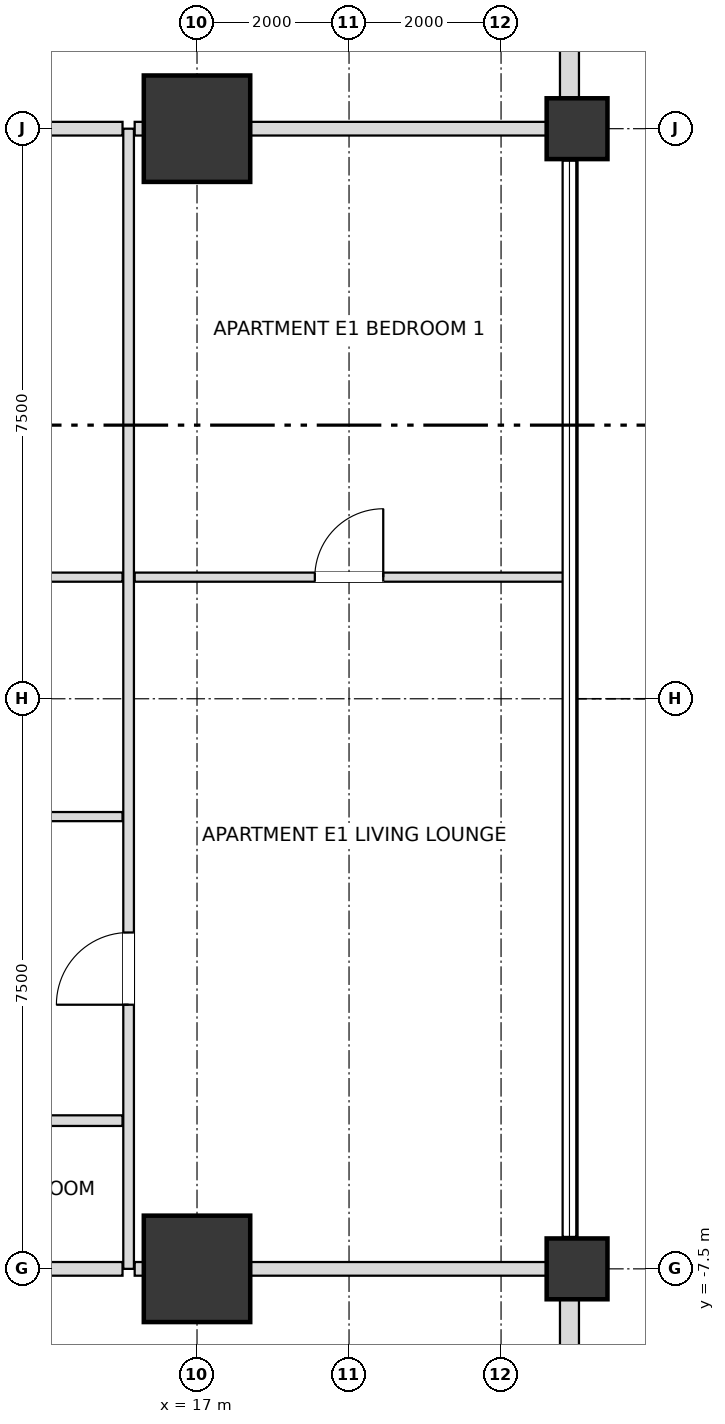
"""IFC4 building model, lengths in metres.
Left out: names, types, materials, properties, quantities, classifications, styles, units other than length and angle.
Written with IfcOpenShell. Run it as: python <this file> out.ifc"""

import sys

from ifc_helpers import new_model, si_unit, direction, frame, frame_2d, origin, origin_2d, place, context, subcontext, project, spatial, rectangle, extrude, element, fill, save


model = new_model("IFC4")
c1 = context("Model", 3, precision=1e-05, world=origin(), true_north=direction((0.0, 1.0)))
c2 = subcontext(c1, "Body", "Model", "MODEL_VIEW")
j1 = project(units=[si_unit("LENGTHUNIT", "METRE"), si_unit("PLANEANGLEUNIT", "RADIAN")], contexts=[c1])
p1 = place(None, origin())
s1 = spatial("IfcSite", under=j1, at=p1, CompositionType="ELEMENT")
p2 = place(p1, origin())
s2 = spatial("IfcBuilding", under=s1, at=p2, CompositionType="ELEMENT")
p3 = place(p2, frame((0.0, 0.0, 39.6)))
s3 = spatial("IfcBuildingStorey", under=s2, at=p3, CompositionType="ELEMENT", Elevation=39.6)
for number, where, z_axis, x_axis in (
    (1, (17.0, -7.5, 0.0), (0.0, 0.0, 1.0), (1.0, 0.0, 0.0)),
    (2, (17.0, 7.5, 0.0), (0.0, 0.0, 1.0), (1.0, 0.0, 0.0)),
):
    element("IfcColumn", number, at=place(p3, frame(where, z_axis=z_axis, x_axis=x_axis)), inside=s3, PredefinedType="USERDEFINED", context=c2, shape_type="SweptSolid", body=[
        extrude(rectangle(XDim=1.4, YDim=1.4, at=origin_2d()), origin(), (0.0, 0.0, 1.0), 3.6),
    ])
for number, where, z_axis, x_axis in (
    (3, (22.0, -7.5, 0.0), (0.0, 0.0, 1.0), (1.0, 0.0, 0.0)),
    (4, (22.0, 7.5, 0.0), (0.0, 0.0, 1.0), (1.0, 0.0, 0.0)),
):
    element("IfcColumn", number, at=place(p3, frame(where, z_axis=z_axis, x_axis=x_axis)), inside=s3, PredefinedType="COLUMN", context=c2, shape_type="SweptSolid", body=[
        extrude(rectangle(XDim=0.8, YDim=0.8, at=origin_2d()), origin(), (0.0, 0.0, 1.0), 3.6),
    ])
p4 = place(p3, frame((21.9, -12.605, 0.0), z_axis=(0.0, 0.0, 1.0), x_axis=(0.0, 1.0, 0.0)))
e5 = element("IfcWall", 5, at=p4, inside=s3, PredefinedType="SOLIDWALL", context=c2, shape_type="SweptSolid", body=[
    extrude(rectangle(XDim=4.71, YDim=0.25, at=frame_2d((2.355, 0.0))), origin(), (0.0, 0.0, 1.0), 2.736),
])
p5 = place(p4, frame((1.455, 0.0, 0.72)))
e6 = element("IfcOpeningElement", 6, at=p5, cuts=e5, PredefinedType="OPENING", context=c2, shape_type="SweptSolid", body=[
    extrude(rectangle(XDim=1.8, YDim=1.68, at=frame_2d((0.9, 0.84))), frame((0.0, 0.135, 0.0), z_axis=(0.0, -1.0, 0.0), x_axis=(1.0, 0.0, 0.0)), (0.0, 0.0, 1.0), 0.27),
])
p6 = place(p3, frame((21.9, 7.895, 0.0), z_axis=(0.0, 0.0, 1.0), x_axis=(0.0, 1.0, 0.0)))
e7 = element("IfcWall", 7, at=p6, inside=s3, PredefinedType="SOLIDWALL", context=c2, shape_type="SweptSolid", body=[
    extrude(rectangle(XDim=4.71, YDim=0.25, at=frame_2d((2.355, 0.0))), origin(), (0.0, 0.0, 1.0), 2.736),
])
p7 = place(p6, frame((1.455, 0.0, 0.72)))
e8 = element("IfcOpeningElement", 8, at=p7, cuts=e7, PredefinedType="OPENING", context=c2, shape_type="SweptSolid", body=[
    extrude(rectangle(XDim=1.8, YDim=1.68, at=frame_2d((0.9, 0.84))), frame((0.0, 0.135, 0.0), z_axis=(0.0, -1.0, 0.0), x_axis=(1.0, 0.0, 0.0)), (0.0, 0.0, 1.0), 0.27),
])
p8 = place(p3, frame((16.1, -7.5, 0.0), z_axis=(0.0, 0.0, 1.0), x_axis=(0.0, 1.0, 0.0)))
e9 = element("IfcWall", 9, at=p8, inside=s3, PredefinedType="PARTITIONING", context=c2, shape_type="SweptSolid", body=[
    extrude(rectangle(XDim=15.0, YDim=0.14, at=frame_2d((7.5, 0.0))), origin(), (0.0, 0.0, 1.0), 3.38),
])
p9 = place(p8, frame((3.475, 0.0, 0.0)))
e10 = element("IfcOpeningElement", 10, at=p9, cuts=e9, PredefinedType="OPENING", context=c2, shape_type="SweptSolid", body=[
    extrude(rectangle(XDim=0.95, YDim=2.1, at=frame_2d((0.475, 1.05))), frame((0.0, 0.08, 0.0), z_axis=(0.0, -1.0, 0.0), x_axis=(1.0, 0.0, 0.0)), (0.0, 0.0, 1.0), 0.16),
])
p10 = place(p3, frame((8.38, -7.5, 0.0), z_axis=(0.0, 0.0, 1.0), x_axis=(1.0, 0.0, 0.0)))
e11 = element("IfcWall", 11, at=p10, inside=s3, PredefinedType="PARTITIONING", context=c2, shape_type="SweptSolid", body=[
    extrude(rectangle(XDim=7.64, YDim=0.18, at=frame_2d((3.82, 0.0))), origin(), (0.0, 0.0, 1.0), 2.816),
])
p11 = place(p3, frame((16.18, -7.5, 0.0), z_axis=(0.0, 0.0, 1.0), x_axis=(1.0, 0.0, 0.0)))
e12 = element("IfcWall", 12, at=p11, inside=s3, PredefinedType="PARTITIONING", context=c2, shape_type="SweptSolid", body=[
    extrude(rectangle(XDim=5.72, YDim=0.18, at=frame_2d((2.86, 0.0))), origin(), (0.0, 0.0, 1.0), 2.816),
])
p12 = place(p3, frame((8.38, -5.55, 0.0), z_axis=(0.0, 0.0, 1.0), x_axis=(1.0, 0.0, 0.0)))
e13 = element("IfcWall", 13, at=p12, inside=s3, PredefinedType="PARTITIONING", context=c2, shape_type="SweptSolid", body=[
    extrude(rectangle(XDim=7.64, YDim=0.14, at=frame_2d((3.82, 0.0))), origin(), (0.0, 0.0, 1.0), 2.948),
])
p13 = place(p12, frame((3.37, 0.0, 0.0)))
e14 = element("IfcOpeningElement", 14, at=p13, cuts=e13, PredefinedType="OPENING", context=c2, shape_type="SweptSolid", body=[
    extrude(rectangle(XDim=0.9, YDim=2.1, at=frame_2d((0.45, 1.05))), frame((0.0, 0.08, 0.0), z_axis=(0.0, -1.0, 0.0), x_axis=(1.0, 0.0, 0.0)), (0.0, 0.0, 1.0), 0.16),
])
p14 = place(p3, frame((8.38, -1.55, 0.0), z_axis=(0.0, 0.0, 1.0), x_axis=(1.0, 0.0, 0.0)))
e15 = element("IfcWall", 15, at=p14, inside=s3, PredefinedType="PARTITIONING", context=c2, shape_type="SweptSolid", body=[
    extrude(rectangle(XDim=7.64, YDim=0.12, at=frame_2d((3.82, 0.0))), origin(), (0.0, 0.0, 1.0), 2.948),
])
p15 = place(p14, frame((3.345, 0.0, 0.0)))
e16 = element("IfcOpeningElement", 16, at=p15, cuts=e15, PredefinedType="OPENING", context=c2, shape_type="SweptSolid", body=[
    extrude(rectangle(XDim=0.95, YDim=2.1, at=frame_2d((0.475, 1.05))), frame((0.0, 0.07, 0.0), z_axis=(0.0, -1.0, 0.0), x_axis=(1.0, 0.0, 0.0)), (0.0, 0.0, 1.0), 0.14),
])
p16 = place(p3, frame((8.38, 1.6, 0.0), z_axis=(0.0, 0.0, 1.0), x_axis=(1.0, 0.0, 0.0)))
e17 = element("IfcWall", 17, at=p16, inside=s3, PredefinedType="PARTITIONING", context=c2, shape_type="SweptSolid", body=[
    extrude(rectangle(XDim=7.64, YDim=0.12, at=frame_2d((3.82, 0.0))), origin(), (0.0, 0.0, 1.0), 2.948),
])
p17 = place(p16, frame((3.37, 0.0, 0.0)))
e18 = element("IfcOpeningElement", 18, at=p17, cuts=e17, PredefinedType="OPENING", context=c2, shape_type="SweptSolid", body=[
    extrude(rectangle(XDim=0.9, YDim=2.1, at=frame_2d((0.45, 1.05))), frame((0.0, 0.07, 0.0), z_axis=(0.0, -1.0, 0.0), x_axis=(1.0, 0.0, 0.0)), (0.0, 0.0, 1.0), 0.14),
])
p18 = place(p3, frame((16.18, 1.6, 0.0), z_axis=(0.0, 0.0, 1.0), x_axis=(1.0, 0.0, 0.0)))
e19 = element("IfcWall", 19, at=p18, inside=s3, PredefinedType="PARTITIONING", context=c2, shape_type="SweptSolid", body=[
    extrude(rectangle(XDim=5.64, YDim=0.12, at=frame_2d((2.82, 0.0))), origin(), (0.0, 0.0, 1.0), 2.816),
])
p19 = place(p18, frame((2.37, 0.0, 0.0)))
e20 = element("IfcOpeningElement", 20, at=p19, cuts=e19, PredefinedType="OPENING", context=c2, shape_type="SweptSolid", body=[
    extrude(rectangle(XDim=0.9, YDim=2.1, at=frame_2d((0.45, 1.05))), frame((0.0, 0.07, 0.0), z_axis=(0.0, -1.0, 0.0), x_axis=(1.0, 0.0, 0.0)), (0.0, 0.0, 1.0), 0.14),
])
p20 = place(p3, frame((8.38, 7.5, 0.0), z_axis=(0.0, 0.0, 1.0), x_axis=(1.0, 0.0, 0.0)))
e21 = element("IfcWall", 21, at=p20, inside=s3, PredefinedType="PARTITIONING", context=c2, shape_type="SweptSolid", body=[
    extrude(rectangle(XDim=7.64, YDim=0.18, at=frame_2d((3.82, 0.0))), origin(), (0.0, 0.0, 1.0), 2.816),
])
p21 = place(p3, frame((16.18, 7.5, 0.0), z_axis=(0.0, 0.0, 1.0), x_axis=(1.0, 0.0, 0.0)))
e22 = element("IfcWall", 22, at=p21, inside=s3, PredefinedType="PARTITIONING", context=c2, shape_type="SweptSolid", body=[
    extrude(rectangle(XDim=5.72, YDim=0.18, at=frame_2d((2.86, 0.0))), origin(), (0.0, 0.0, 1.0), 2.816),
])
p22 = place(p9, origin())
e23 = element("IfcDoor", 23, at=p22, inside=s3, OperationType="SINGLE_SWING_LEFT", PredefinedType="DOOR", context=c2, shape_type="SweptSolid", body=[
    extrude(rectangle(XDim=0.95, YDim=2.1, at=frame_2d((0.475, 1.05))), frame((0.0, 0.025, 0.0), z_axis=(0.0, -1.0, 0.0), x_axis=(1.0, 0.0, 0.0)), (0.0, 0.0, 1.0), 0.05),
])
fill(e10, e23)
p23 = place(p19, origin())
e24 = element("IfcDoor", 24, at=p23, inside=s3, OperationType="SINGLE_SWING_RIGHT", PredefinedType="DOOR", context=c2, shape_type="SweptSolid", body=[
    extrude(rectangle(XDim=0.9, YDim=2.1, at=frame_2d((0.45, 1.05))), frame((0.0, 0.025, 0.0), z_axis=(0.0, -1.0, 0.0), x_axis=(1.0, 0.0, 0.0)), (0.0, 0.0, 1.0), 0.05),
])
fill(e20, e24)
save(model, sys.argv[1])
